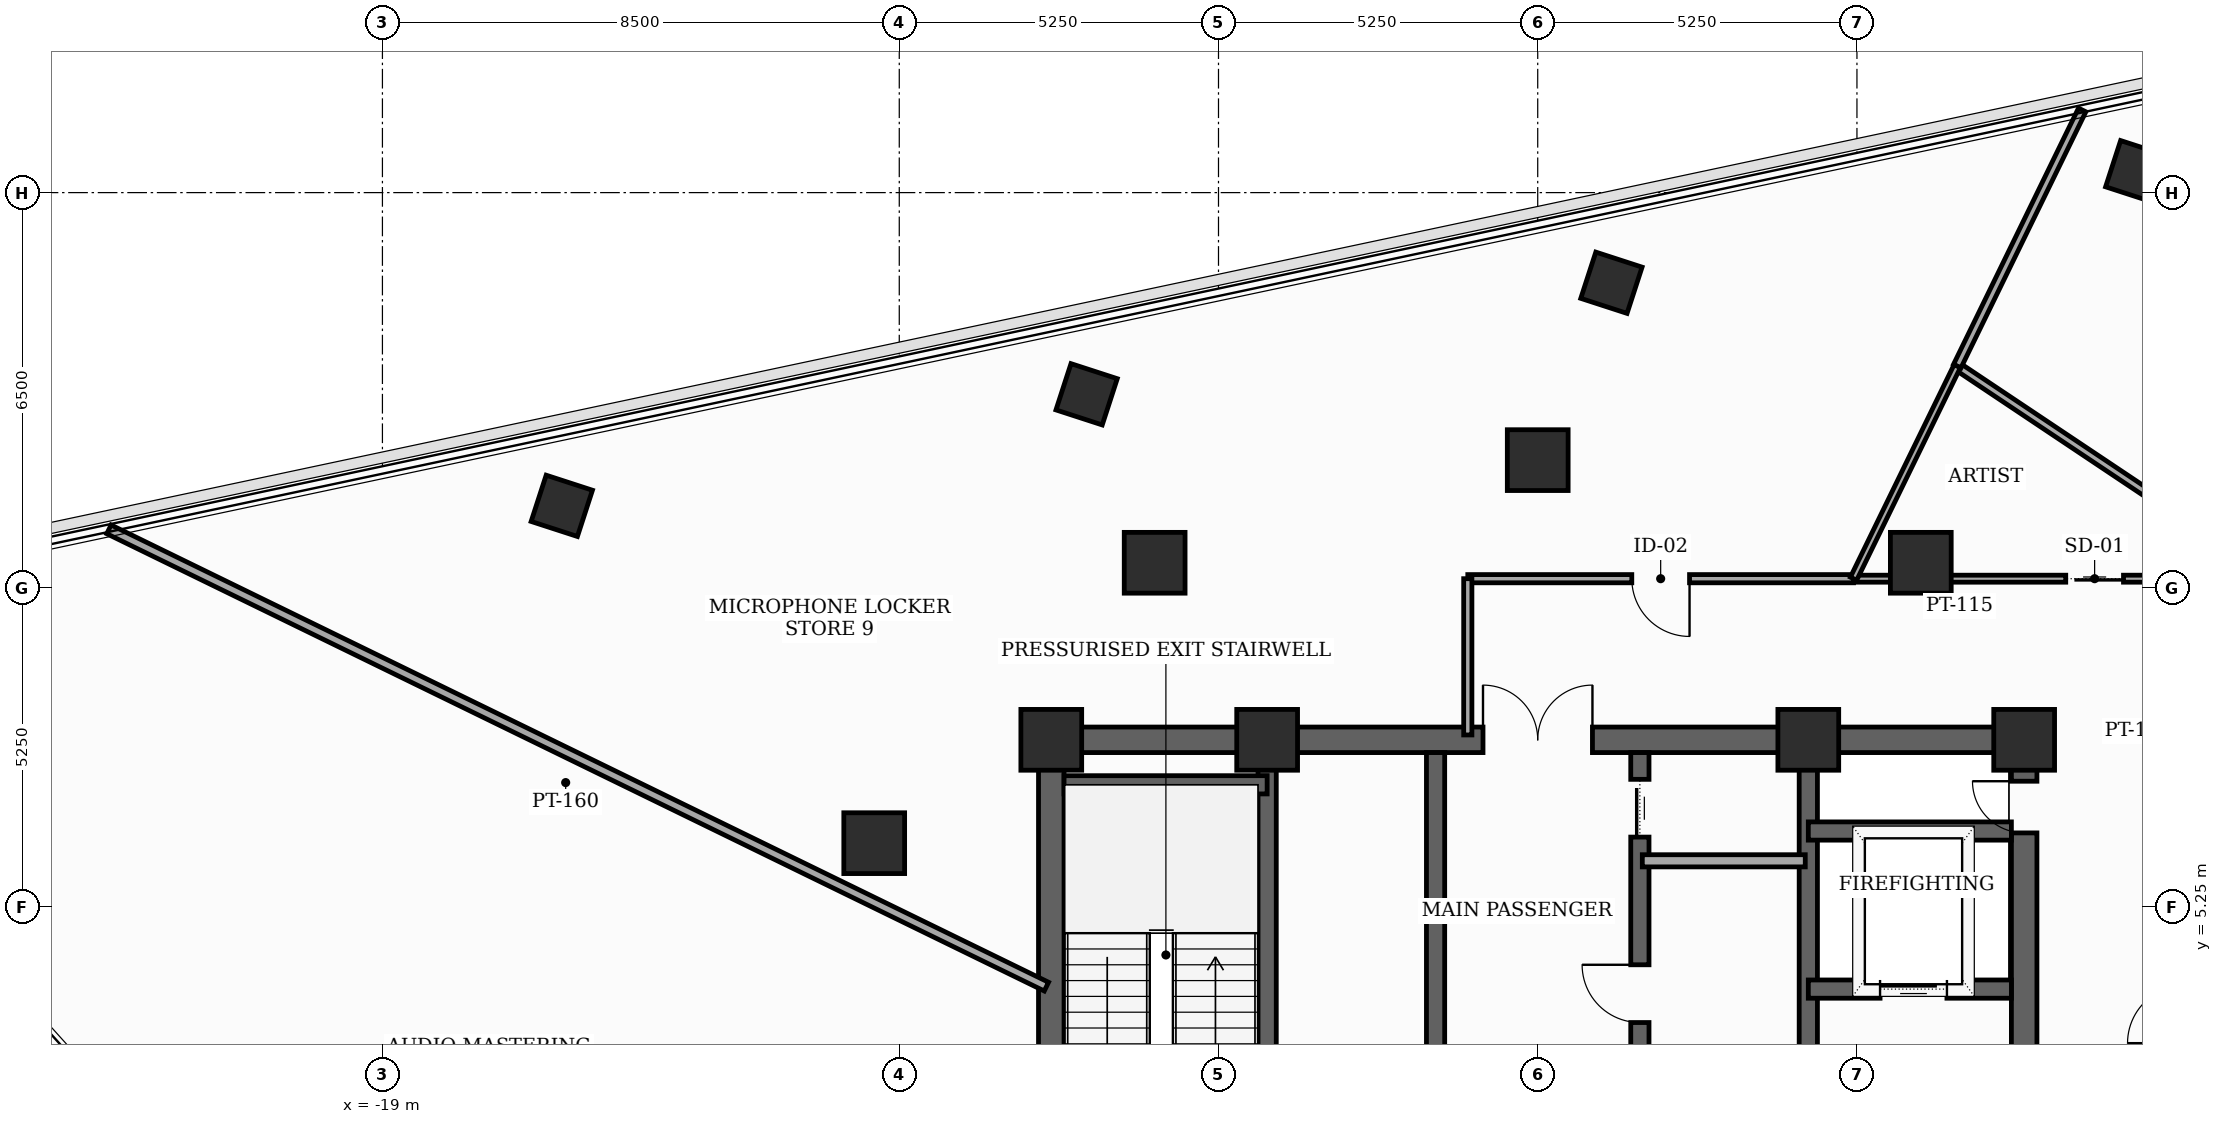
"""IFC4 building model, lengths in metres.
Left out: names, types, materials, properties, quantities, classifications, styles, units other than length and angle.
Written with IfcOpenShell. Run it as: python <this file> out.ifc"""

import sys

from ifc_helpers import new_model, si_unit, direction, frame, frame_2d, origin, origin_2d, place, context, subcontext, project, spatial, rectangle, extrude, element, fill, save


model = new_model("IFC4")
c1 = context("Model", 3, precision=1e-05, world=origin(), true_north=direction((0.0, 1.0)))
c2 = subcontext(c1, "Body", "Model", "MODEL_VIEW")
j1 = project(units=[si_unit("LENGTHUNIT", "METRE"), si_unit("PLANEANGLEUNIT", "RADIAN")], contexts=[c1])
p1 = place(None, origin())
s1 = spatial("IfcSite", under=j1, at=p1, CompositionType="ELEMENT")
p2 = place(p1, origin())
s2 = spatial("IfcBuilding", under=s1, at=p2, CompositionType="ELEMENT")
p3 = place(p2, frame((0.0, 0.0, 309.1)))
s3 = spatial("IfcBuildingStorey", under=s2, at=p3, CompositionType="ELEMENT", Elevation=309.1)
for number, where, z_axis, x_axis in (
    (1, (8.0, 8.0, 0.0), (0.0, 0.0, 1.0), (1.0, 0.0, 0.0)),
    (2, (4.45, 8.0, 0.0), (0.0, 0.0, 1.0), (1.0, 0.0, 0.0)),
    (3, (-4.45, 8.0, 0.0), (0.0, 0.0, 1.0), (1.0, 0.0, 0.0)),
    (4, (-8.0, 8.0, 0.0), (0.0, 0.0, 1.0), (1.0, 0.0, 0.0)),
    (5, (6.3, 10.912, 0.0), (0.0, 0.0, 1.0), (1.0, 0.0, 0.0)),
    (6, (0.0, 12.6, 0.0), (0.0, 0.0, 1.0), (1.0, 0.0, 0.0)),
    (7, (-6.3, 10.912, 0.0), (0.0, 0.0, 1.0), (1.0, 0.0, 0.0)),
    (8, (-10.912, 6.3, 0.0), (0.0, 0.0, 1.0), (1.0, 0.0, 0.0)),
):
    element("IfcColumn", number, at=place(p3, frame(where, z_axis=z_axis, x_axis=x_axis)), inside=s3, PredefinedType="COLUMN", context=c2, shape_type="SweptSolid", body=[
        extrude(rectangle(XDim=1.0, YDim=1.0, at=origin_2d()), origin(), (0.0, 0.0, 1.0), 3.7),
    ])
for number, where, z_axis, x_axis in (
    (9, (9.844, 17.352, 0.0), (0.0, 0.0, 1.0), (0.309, 0.951, 0.0)),
    (10, (1.212, 15.518, 0.0), (0.0, 0.0, 1.0), (0.309, 0.951, 0.0)),
    (11, (-7.419, 13.683, 0.0), (0.0, 0.0, 1.0), (0.309, 0.951, 0.0)),
    (12, (-16.05, 11.848, 0.0), (0.0, 0.0, 1.0), (0.309, 0.951, 0.0)),
):
    element("IfcColumn", number, at=place(p3, frame(where, z_axis=z_axis, x_axis=x_axis)), inside=s3, PredefinedType="COLUMN", context=c2, shape_type="SweptSolid", body=[
        extrude(rectangle(XDim=0.8, YDim=0.8, at=origin_2d()), origin(), (0.0, 0.0, 1.0), 3.7),
    ])
p4 = place(p3, frame((-8.0, -8.0, 0.0), z_axis=(0.0, 0.0, 1.0), x_axis=(0.0, 1.0, 0.0)))
e13 = element("IfcWall", 13, at=p4, inside=s3, PredefinedType="SHEAR", context=c2, shape_type="SweptSolid", body=[
    extrude(rectangle(XDim=16.0, YDim=0.42, at=frame_2d((8.0, 0.0))), origin(), (0.0, 0.0, 1.0), 3.44),
])
p5 = place(p4, frame((0.681, 0.0, 0.0)))
e14 = element("IfcOpeningElement", 14, at=p5, cuts=e13, PredefinedType="OPENING", context=c2, shape_type="SweptSolid", body=[
    extrude(rectangle(XDim=0.85, YDim=2.02, at=frame_2d((0.425, 1.01))), frame((0.0, 0.22, 0.0), z_axis=(0.0, -1.0, 0.0), x_axis=(1.0, 0.0, 0.0)), (0.0, 0.0, 1.0), 0.44),
])
p6 = place(p4, frame((5.35, 0.0, 0.0)))
e15 = element("IfcOpeningElement", 15, at=p6, cuts=e13, PredefinedType="OPENING", context=c2, shape_type="SweptSolid", body=[
    extrude(rectangle(XDim=1.05, YDim=2.15, at=frame_2d((0.525, 1.075))), frame((0.0, 0.22, 0.0), z_axis=(0.0, -1.0, 0.0), x_axis=(1.0, 0.0, 0.0)), (0.0, 0.0, 1.0), 0.44),
])
p7 = place(p3, frame((8.0, -8.0, 0.0), z_axis=(0.0, 0.0, 1.0), x_axis=(0.0, 1.0, 0.0)))
e16 = element("IfcWall", 16, at=p7, inside=s3, PredefinedType="SHEAR", context=c2, shape_type="SweptSolid", body=[
    extrude(rectangle(XDim=16.0, YDim=0.42, at=frame_2d((8.0, 0.0))), origin(), (0.0, 0.0, 1.0), 3.44),
])
p8 = place(p7, frame((9.6, 0.0, 0.0)))
e17 = element("IfcOpeningElement", 17, at=p8, cuts=e16, PredefinedType="OPENING", context=c2, shape_type="SweptSolid", body=[
    extrude(rectangle(XDim=1.05, YDim=2.15, at=frame_2d((0.525, 1.075))), frame((0.0, 0.22, 0.0), z_axis=(0.0, -1.0, 0.0), x_axis=(1.0, 0.0, 0.0)), (0.0, 0.0, 1.0), 0.44),
])
p9 = place(p7, frame((14.469, 0.0, 0.0)))
e18 = element("IfcOpeningElement", 18, at=p9, cuts=e16, PredefinedType="OPENING", context=c2, shape_type="SweptSolid", body=[
    extrude(rectangle(XDim=0.85, YDim=2.02, at=frame_2d((0.425, 1.01))), frame((0.0, 0.22, 0.0), z_axis=(0.0, -1.0, 0.0), x_axis=(1.0, 0.0, 0.0)), (0.0, 0.0, 1.0), 0.44),
])
p10 = place(p3, frame((-8.0, 8.0, 0.0), z_axis=(0.0, 0.0, 1.0), x_axis=(1.0, 0.0, 0.0)))
e19 = element("IfcWall", 19, at=p10, inside=s3, PredefinedType="SHEAR", context=c2, shape_type="SweptSolid", body=[
    extrude(rectangle(XDim=16.0, YDim=0.42, at=frame_2d((8.0, 0.0))), origin(), (0.0, 0.0, 1.0), 3.44),
])
p11 = place(p10, frame((7.1, 0.0, 0.0)))
e20 = element("IfcOpeningElement", 20, at=p11, cuts=e19, PredefinedType="OPENING", context=c2, shape_type="SweptSolid", body=[
    extrude(rectangle(XDim=1.8, YDim=2.15, at=frame_2d((0.9, 1.075))), frame((0.0, 0.22, 0.0), z_axis=(0.0, -1.0, 0.0), x_axis=(1.0, 0.0, 0.0)), (0.0, 0.0, 1.0), 0.44),
])
for number, where, z_axis, x_axis in (
    (21, (-4.45, -7.79, 0.0), (0.0, 0.0, 1.0), (0.0, 1.0, 0.0)),
    (22, (4.45, -7.79, 0.0), (0.0, 0.0, 1.0), (0.0, 1.0, 0.0)),
):
    element("IfcWall", number, at=place(p3, frame(where, z_axis=z_axis, x_axis=x_axis)), inside=s3, PredefinedType="SHEAR", context=c2, shape_type="SweptSolid", body=[
        extrude(rectangle(XDim=15.58, YDim=0.3, at=frame_2d((7.79, 0.0))), origin(), (0.0, 0.0, 1.0), 3.44),
    ])
p12 = place(p3, frame((-7.79, 7.26, 0.0), z_axis=(0.0, 0.0, 1.0), x_axis=(1.0, 0.0, 0.0)))
e23 = element("IfcWall", 23, at=p12, inside=s3, PredefinedType="SHEAR", context=c2, shape_type="SweptSolid", body=[
    extrude(rectangle(XDim=3.34, YDim=0.3, at=frame_2d((1.67, 0.0))), origin(), (0.0, 0.0, 1.0), 3.44),
])
p13 = place(p3, frame((4.45, 3.9, 0.0), z_axis=(0.0, 0.0, 1.0), x_axis=(1.0, 0.0, 0.0)))
e24 = element("IfcWall", 24, at=p13, inside=s3, PredefinedType="SHEAR", context=c2, shape_type="SweptSolid", body=[
    extrude(rectangle(XDim=3.34, YDim=0.3, at=frame_2d((1.67, 0.0))), origin(), (0.0, 0.0, 1.0), 3.44),
])
p14 = place(p13, frame((1.18, 0.0, 0.0)))
e25 = element("IfcOpeningElement", 25, at=p14, cuts=e24, PredefinedType="OPENING", context=c2, shape_type="SweptSolid", body=[
    extrude(rectangle(XDim=1.1, YDim=2.1, at=frame_2d((0.55, 1.05))), frame((0.0, 0.16, 0.0), z_axis=(0.0, -1.0, 0.0), x_axis=(1.0, 0.0, 0.0)), (0.0, 0.0, 1.0), 0.32),
])
p15 = place(p3, frame((4.45, 6.5, 0.0), z_axis=(0.0, 0.0, 1.0), x_axis=(1.0, 0.0, 0.0)))
e26 = element("IfcWall", 26, at=p15, inside=s3, PredefinedType="SHEAR", context=c2, shape_type="SweptSolid", body=[
    extrude(rectangle(XDim=3.34, YDim=0.3, at=frame_2d((1.67, 0.0))), origin(), (0.0, 0.0, 1.0), 3.44),
])
p16 = place(p3, frame((-1.68, -4.85, 0.0), z_axis=(0.0, 0.0, 1.0), x_axis=(0.0, 1.0, 0.0)))
e27 = element("IfcWall", 27, at=p16, inside=s3, PredefinedType="SHEAR", context=c2, shape_type="SweptSolid", body=[
    extrude(rectangle(XDim=12.64, YDim=0.3, at=frame_2d((6.32, 0.0))), origin(), (0.0, 0.0, 1.0), 3.44),
])
p17 = place(p16, frame((1.05, 0.0, 0.0)))
e28 = element("IfcOpeningElement", 28, at=p17, cuts=e27, PredefinedType="OPENING", context=c2, shape_type="SweptSolid", body=[
    extrude(rectangle(XDim=0.85, YDim=2.02, at=frame_2d((0.425, 1.01))), frame((0.0, 0.16, 0.0), z_axis=(0.0, -1.0, 0.0), x_axis=(1.0, 0.0, 0.0)), (0.0, 0.0, 1.0), 0.32),
])
p18 = place(p16, frame((6.8, 0.0, 0.0)))
e29 = element("IfcOpeningElement", 29, at=p18, cuts=e27, PredefinedType="OPENING", context=c2, shape_type="SweptSolid", body=[
    extrude(rectangle(XDim=0.95, YDim=2.1, at=frame_2d((0.475, 1.05))), frame((0.0, 0.16, 0.0), z_axis=(0.0, -1.0, 0.0), x_axis=(1.0, 0.0, 0.0)), (0.0, 0.0, 1.0), 0.32),
])
p19 = place(p3, frame((1.68, -4.85, 0.0), z_axis=(0.0, 0.0, 1.0), x_axis=(0.0, 1.0, 0.0)))
e30 = element("IfcWall", 30, at=p19, inside=s3, PredefinedType="SHEAR", context=c2, shape_type="SweptSolid", body=[
    extrude(rectangle(XDim=12.64, YDim=0.3, at=frame_2d((6.32, 0.0))), origin(), (0.0, 0.0, 1.0), 3.44),
])
p20 = place(p19, frame((0.55, 0.0, 0.0)))
e31 = element("IfcOpeningElement", 31, at=p20, cuts=e30, PredefinedType="OPENING", context=c2, shape_type="SweptSolid", body=[
    extrude(rectangle(XDim=1.1, YDim=2.1, at=frame_2d((0.55, 1.05))), frame((0.0, 0.16, 0.0), z_axis=(0.0, -1.0, 0.0), x_axis=(1.0, 0.0, 0.0)), (0.0, 0.0, 1.0), 0.32),
])
p21 = place(p19, frame((2.65, 0.0, 0.0)))
e32 = element("IfcOpeningElement", 32, at=p21, cuts=e30, PredefinedType="OPENING", context=c2, shape_type="SweptSolid", body=[
    extrude(rectangle(XDim=1.1, YDim=2.1, at=frame_2d((0.55, 1.05))), frame((0.0, 0.16, 0.0), z_axis=(0.0, -1.0, 0.0), x_axis=(1.0, 0.0, 0.0)), (0.0, 0.0, 1.0), 0.32),
])
p22 = place(p19, frame((4.75, 0.0, 0.0)))
e33 = element("IfcOpeningElement", 33, at=p22, cuts=e30, PredefinedType="OPENING", context=c2, shape_type="SweptSolid", body=[
    extrude(rectangle(XDim=1.1, YDim=2.1, at=frame_2d((0.55, 1.05))), frame((0.0, 0.16, 0.0), z_axis=(0.0, -1.0, 0.0), x_axis=(1.0, 0.0, 0.0)), (0.0, 0.0, 1.0), 0.32),
])
p23 = place(p19, frame((8.2, 0.0, 0.0)))
e34 = element("IfcOpeningElement", 34, at=p23, cuts=e30, PredefinedType="OPENING", context=c2, shape_type="SweptSolid", body=[
    extrude(rectangle(XDim=0.95, YDim=2.1, at=frame_2d((0.475, 1.05))), frame((0.0, 0.16, 0.0), z_axis=(0.0, -1.0, 0.0), x_axis=(1.0, 0.0, 0.0)), (0.0, 0.0, 1.0), 0.32),
])
p24 = place(p19, frame((11.25, 0.0, 0.0)))
e35 = element("IfcOpeningElement", 35, at=p24, cuts=e30, PredefinedType="OPENING", context=c2, shape_type="SweptSolid", body=[
    extrude(rectangle(XDim=0.95, YDim=2.1, at=frame_2d((0.475, 1.05))), frame((0.0, 0.16, 0.0), z_axis=(0.0, -1.0, 0.0), x_axis=(1.0, 0.0, 0.0)), (0.0, 0.0, 1.0), 0.32),
])
p25 = place(p3, frame((1.72, 6.01, 0.0), z_axis=(0.0, 0.0, 1.0), x_axis=(1.0, 0.0, 0.0)))
e36 = element("IfcWall", 36, at=p25, inside=s3, PredefinedType="SOLIDWALL", context=c2, shape_type="SweptSolid", body=[
    extrude(rectangle(XDim=2.68, YDim=0.2, at=frame_2d((1.34, 0.0))), origin(), (0.0, 0.0, 1.0), 3.44),
])
p26 = place(p3, frame((10.15, 10.65, 0.0), z_axis=(0.0, 0.0, 1.0), x_axis=(-1.0, 0.0, 0.0)))
e37 = element("IfcWall", 37, at=p26, inside=s3, PredefinedType="PARTITIONING", context=c2, shape_type="SweptSolid", body=[
    extrude(rectangle(XDim=4.956, YDim=0.115, at=frame_2d((2.478, 0.0))), origin(), (0.0, 0.0, 1.0), 2.04),
])
p27 = place(p26, frame((0.516, 0.0, 0.0)))
e38 = element("IfcOpeningElement", 38, at=p27, cuts=e37, PredefinedType="OPENING", context=c2, shape_type="SweptSolid", body=[
    extrude(rectangle(XDim=0.95, YDim=2.0, at=frame_2d((0.475, 1.0))), frame((0.0, 0.067, 0.0), z_axis=(0.0, -1.0, 0.0), x_axis=(1.0, 0.0, 0.0)), (0.0, 0.0, 1.0), 0.135),
])
p28 = place(p3, frame((5.194, 10.65, 0.0), z_axis=(0.0, 0.0, 1.0), x_axis=(-1.0, 0.0, 0.0)))
e39 = element("IfcWall", 39, at=p28, inside=s3, PredefinedType="PARTITIONING", context=c2, shape_type="SweptSolid", body=[
    extrude(rectangle(XDim=6.344, YDim=0.135, at=frame_2d((3.172, 0.0))), origin(), (0.0, 0.0, 1.0), 2.04),
])
p29 = place(p28, frame((2.697, 0.0, 0.0)))
e40 = element("IfcOpeningElement", 40, at=p29, cuts=e39, PredefinedType="OPENING", context=c2, shape_type="SweptSolid", body=[
    extrude(rectangle(XDim=0.95, YDim=2.0, at=frame_2d((0.475, 1.0))), frame((0.0, 0.077, 0.0), z_axis=(0.0, -1.0, 0.0), x_axis=(1.0, 0.0, 0.0)), (0.0, 0.0, 1.0), 0.155),
])
p30 = place(p3, frame((-1.15, 10.65, 0.0), z_axis=(0.0, 0.0, 1.0), x_axis=(0.0, -1.0, 0.0)))
e41 = element("IfcWall", 41, at=p30, inside=s3, PredefinedType="PARTITIONING", context=c2, shape_type="SweptSolid", body=[
    extrude(rectangle(XDim=2.57, YDim=0.135, at=frame_2d((1.285, 0.0))), origin(), (0.0, 0.0, 1.0), 2.825),
])
p31 = place(p3, frame((-8.08, 3.941, 0.0), z_axis=(0.0, 0.0, 1.0), x_axis=(-0.898778840696, 0.438402321523, 0.0)))
e42 = element("IfcWall", 42, at=p31, inside=s3, PredefinedType="PARTITIONING", context=c2, shape_type="SweptSolid", body=[
    extrude(rectangle(XDim=17.154, YDim=0.16, at=frame_2d((8.577, 0.0))), origin(), (0.0, 0.0, 1.0), 2.04),
])
p32 = place(p3, frame((6.899, 14.145, 0.0), z_axis=(0.0, 0.0, 1.0), x_axis=(0.831510168033, -0.555509532283, 0.0)))
e43 = element("IfcWall", 43, at=p32, inside=s3, PredefinedType="PARTITIONING", context=c2, shape_type="SweptSolid", body=[
    extrude(rectangle(XDim=4.663, YDim=0.135, at=frame_2d((2.331, 0.0))), origin(), (0.0, 0.0, 1.0), 2.04),
])
p33 = place(p3, frame((8.954, 18.359, 0.0), z_axis=(0.0, 0.0, 1.0), x_axis=(-0.438339504666, -0.898809478504, 0.0)))
e44 = element("IfcWall", 44, at=p33, inside=s3, PredefinedType="PARTITIONING", context=c2, shape_type="SweptSolid", body=[
    extrude(rectangle(XDim=4.688, YDim=0.135, at=frame_2d((2.344, 0.0))), origin(), (0.0, 0.0, 1.0), 2.04),
])
p34 = place(p3, frame((6.899, 14.145, 0.0), z_axis=(0.0, 0.0, 1.0), x_axis=(-0.438402604201, -0.898778702813, 0.0)))
e45 = element("IfcWall", 45, at=p34, inside=s3, PredefinedType="PARTITIONING", context=c2, shape_type="SweptSolid", body=[
    extrude(rectangle(XDim=3.889, YDim=0.115, at=frame_2d((1.944, 0.0))), origin(), (0.0, 0.0, 1.0), 2.04),
])
p35 = place(p9, origin())
e46 = element("IfcDoor", 46, at=p35, inside=s3, OperationType="SINGLE_SWING_RIGHT", PredefinedType="TRAPDOOR", context=c2, shape_type="SweptSolid", body=[
    extrude(rectangle(XDim=0.85, YDim=2.02, at=frame_2d((0.425, 1.01))), frame((0.0, 0.025, 0.0), z_axis=(0.0, -1.0, 0.0), x_axis=(1.0, 0.0, 0.0)), (0.0, 0.0, 1.0), 0.05),
])
fill(e18, e46)
p36 = place(p11, origin())
e47 = element("IfcDoor", 47, at=p36, inside=s3, OperationType="DOUBLE_DOOR_SINGLE_SWING", PredefinedType="DOOR", context=c2, shape_type="SweptSolid", body=[
    extrude(rectangle(XDim=1.8, YDim=2.15, at=frame_2d((0.9, 1.075))), frame((0.0, 0.025, 0.0), z_axis=(0.0, -1.0, 0.0), x_axis=(1.0, 0.0, 0.0)), (0.0, 0.0, 1.0), 0.05),
])
fill(e20, e47)
p37 = place(p14, origin())
e48 = element("IfcDoor", 48, at=p37, inside=s3, OperationType="SLIDING_TO_LEFT", PredefinedType="DOOR", context=c2, shape_type="SweptSolid", body=[
    extrude(rectangle(XDim=1.1, YDim=2.1, at=frame_2d((0.55, 1.05))), frame((0.0, 0.025, 0.0), z_axis=(0.0, -1.0, 0.0), x_axis=(1.0, 0.0, 0.0)), (0.0, 0.0, 1.0), 0.05),
])
fill(e25, e48)
p38 = place(p23, origin())
e49 = element("IfcDoor", 49, at=p38, inside=s3, OperationType="SINGLE_SWING_RIGHT", PredefinedType="DOOR", context=c2, shape_type="SweptSolid", body=[
    extrude(rectangle(XDim=0.95, YDim=2.1, at=frame_2d((0.475, 1.05))), frame((0.0, 0.025, 0.0), z_axis=(0.0, -1.0, 0.0), x_axis=(1.0, 0.0, 0.0)), (0.0, 0.0, 1.0), 0.05),
])
fill(e34, e49)
p39 = place(p24, origin())
e50 = element("IfcDoor", 50, at=p39, inside=s3, OperationType="SLIDING_TO_LEFT", PredefinedType="DOOR", context=c2, shape_type="SweptSolid", body=[
    extrude(rectangle(XDim=0.95, YDim=2.1, at=frame_2d((0.475, 1.05))), frame((0.0, 0.025, 0.0), z_axis=(0.0, -1.0, 0.0), x_axis=(1.0, 0.0, 0.0)), (0.0, 0.0, 1.0), 0.05),
])
fill(e35, e50)
p40 = place(p27, origin())
e51 = element("IfcDoor", 51, at=p40, inside=s3, OperationType="SLIDING_TO_LEFT", PredefinedType="DOOR", context=c2, shape_type="SweptSolid", body=[
    extrude(rectangle(XDim=0.95, YDim=2.0, at=frame_2d((0.475, 1.0))), frame((0.0, 0.025, 0.0), z_axis=(0.0, -1.0, 0.0), x_axis=(1.0, 0.0, 0.0)), (0.0, 0.0, 1.0), 0.05),
])
fill(e38, e51)
p41 = place(p29, origin())
e52 = element("IfcDoor", 52, at=p41, inside=s3, OperationType="SINGLE_SWING_LEFT", PredefinedType="DOOR", context=c2, shape_type="SweptSolid", body=[
    extrude(rectangle(XDim=0.95, YDim=2.0, at=frame_2d((0.475, 1.0))), frame((0.0, 0.025, 0.0), z_axis=(0.0, -1.0, 0.0), x_axis=(1.0, 0.0, 0.0)), (0.0, 0.0, 1.0), 0.05),
])
fill(e40, e52)
save(model, sys.argv[1])
